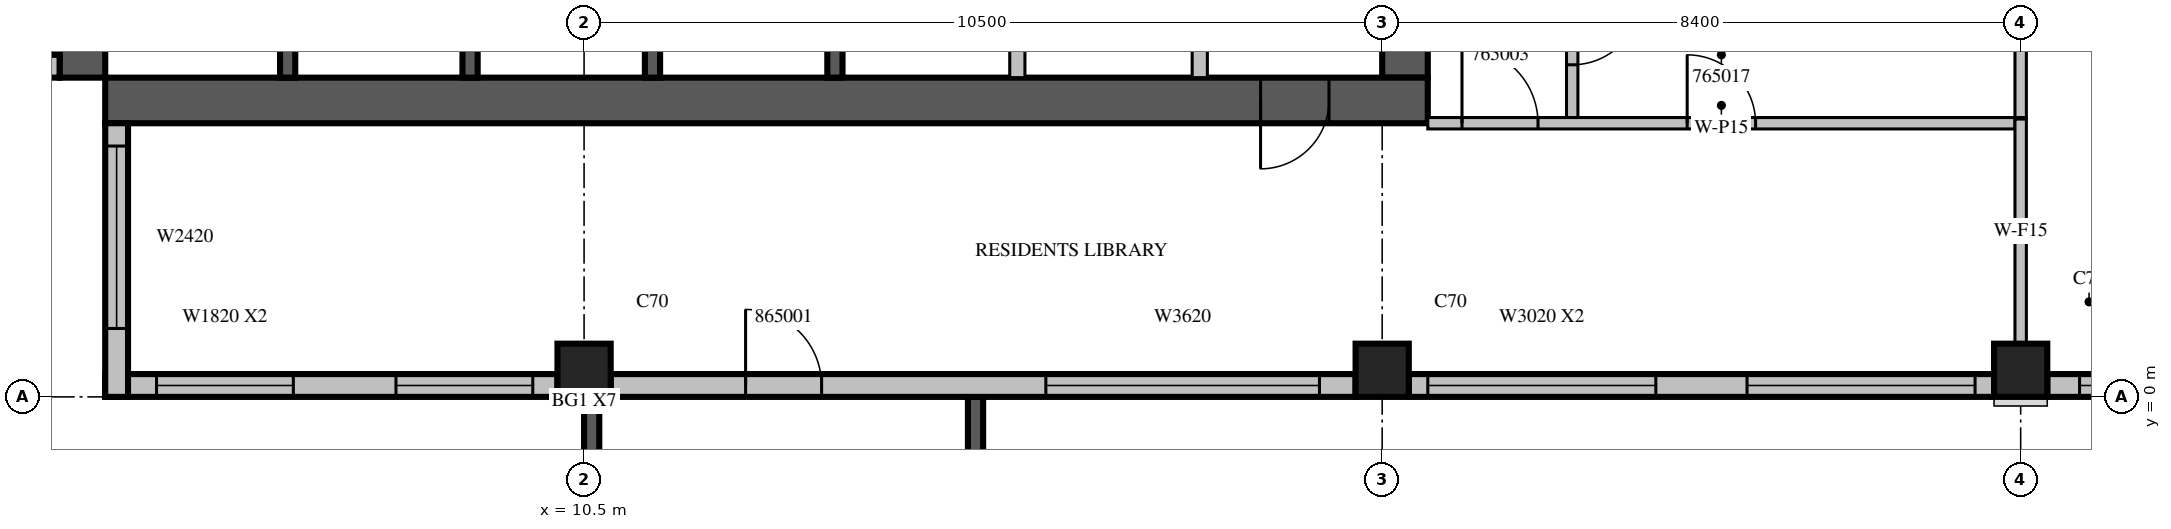
"""IFC4 building model, lengths in metres.
Left out: names, types, materials, properties, quantities, classifications, styles, units other than length and angle.
Written with IfcOpenShell. Run it as: python <this file> out.ifc"""

import sys

from ifc_helpers import new_model, si_unit, direction, frame, frame_2d, origin, origin_2d, place, context, subcontext, project, spatial, rectangle, extrude, source, transform, mapped, element, fill, save


model = new_model("IFC4")
c1 = context("Model", 3, precision=1e-05, world=origin(), true_north=direction((0.0, 1.0)))
c2 = subcontext(c1, "Body", "Model", "MODEL_VIEW")
j1 = project(units=[si_unit("LENGTHUNIT", "METRE"), si_unit("PLANEANGLEUNIT", "RADIAN")], contexts=[c1])
p1 = place(None, origin())
s1 = spatial("IfcSite", under=j1, at=p1, CompositionType="ELEMENT")
p2 = place(p1, origin())
s2 = spatial("IfcBuilding", under=s1, at=p2, CompositionType="ELEMENT")
p3 = place(p2, frame((0.0, 0.0, 288.0)))
s3 = spatial("IfcBuildingStorey", under=s2, at=p3, CompositionType="ELEMENT", Elevation=288.0)
m1 = source(origin(), c2, "Body", "SweptSolid", [
    extrude(rectangle(XDim=0.7, YDim=0.7, at=origin_2d()), origin(), (0.0, 0.0, 1.0), 3.5),
])
for number, where, z_axis, x_axis in (
    (1, (10.5, 0.35, 0.0), (0.0, 0.0, 1.0), (1.0, 0.0, 0.0)),
    (2, (21.0, 0.35, 0.0), (0.0, 0.0, 1.0), (1.0, 0.0, 0.0)),
    (3, (29.4, 0.35, 0.0), (0.0, 0.0, 1.0), (1.0, 0.0, 0.0)),
):
    element("IfcColumn", number, at=place(p3, frame(where, z_axis=z_axis, x_axis=x_axis)), inside=s3, PredefinedType="COLUMN", context=c2, shape_type="MappedRepresentation", body=[
        mapped(m1, transform((0.0, 0.0, 0.0), scale=1.0)),
    ])
m2 = source(origin(), c2, "Body", "SweptSolid", [
    extrude(rectangle(XDim=17.4, YDim=0.6, at=frame_2d((8.7, 0.0))), origin(), (0.0, 0.0, 1.0), 3.5),
])
p4 = place(p3, frame((3.9, 4.2, 0.0), z_axis=(0.0, 0.0, 1.0), x_axis=(0.0, 1.0, 0.0)))
e4 = element("IfcWall", 4, at=p4, inside=s3, PredefinedType="SHEAR", context=c2, shape_type="MappedRepresentation", body=[
    mapped(m2, transform((0.0, 0.0, 0.0), scale=1.0)),
])
m3 = source(origin(), c2, "Body", "SweptSolid", [
    extrude(rectangle(XDim=2.2, YDim=2.1, at=frame_2d((1.1, 1.05))), frame((0.0, 0.31, 0.0), z_axis=(0.0, -1.0, 0.0), x_axis=(1.0, 0.0, 0.0)), (0.0, 0.0, 1.0), 0.62),
])
p5 = place(p4, frame((4.2, 0.0, 0.0)))
e5 = element("IfcOpeningElement", 5, at=p5, cuts=e4, PredefinedType="OPENING", context=c2, shape_type="MappedRepresentation", body=[
    mapped(m3, transform((0.0, 0.0, 0.0), scale=1.0)),
])
m4 = source(origin(), c2, "Body", "SweptSolid", [
    extrude(rectangle(XDim=6.3, YDim=0.6, at=frame_2d((3.15, 0.0))), origin(), (0.0, 0.0, 1.0), 3.5),
])
p6 = place(p3, frame((21.3, 4.2, 0.0), z_axis=(0.0, 0.0, 1.0), x_axis=(0.0, 1.0, 0.0)))
e6 = element("IfcWall", 6, at=p6, inside=s3, PredefinedType="SHEAR", context=c2, shape_type="MappedRepresentation", body=[
    mapped(m4, transform((0.0, 0.0, 0.0), scale=1.0)),
])
p7 = place(p6, frame((4.0, 0.0, 0.0)))
e7 = element("IfcOpeningElement", 7, at=p7, cuts=e6, PredefinedType="OPENING", context=c2, shape_type="MappedRepresentation", body=[
    mapped(m3, transform((0.0, 0.0, 0.0), scale=1.0)),
])
p8 = place(p3, frame((4.2, 3.9, 0.0), z_axis=(0.0, 0.0, 1.0), x_axis=(1.0, 0.0, 0.0)))
e8 = element("IfcWall", 8, at=p8, inside=s3, PredefinedType="SHEAR", context=c2, shape_type="MappedRepresentation", body=[
    mapped(m2, transform((0.0, 0.0, 0.0), scale=1.0)),
])
m5 = source(origin(), c2, "Body", "SweptSolid", [
    extrude(rectangle(XDim=0.9, YDim=2.1, at=frame_2d((0.45, 1.05))), frame((0.0, 0.31, 0.0), z_axis=(0.0, -1.0, 0.0), x_axis=(1.0, 0.0, 0.0)), (0.0, 0.0, 1.0), 0.62),
])
p9 = place(p8, frame((15.2, 0.0, 0.0)))
e9 = element("IfcOpeningElement", 9, at=p9, cuts=e8, PredefinedType="OPENING", context=c2, shape_type="MappedRepresentation", body=[
    mapped(m5, transform((0.0, 0.0, 0.0), scale=1.0)),
])
p10 = place(p3, frame((10.6, 0.0, 0.0), z_axis=(0.0, 0.0, 1.0), x_axis=(0.0, -1.0, 0.0)))
e10 = element("IfcWall", 10, at=p10, inside=s3, PredefinedType="SOLIDWALL", context=c2, shape_type="SweptSolid", body=[
    extrude(rectangle(XDim=3.9, YDim=0.2, at=frame_2d((1.95, 0.0))), origin(), (0.0, 0.0, 1.0), 3.1),
])
m6 = source(origin(), c2, "Body", "SweptSolid", [
    extrude(rectangle(XDim=2.4, YDim=2.0, at=frame_2d((1.2, 1.0))), frame((0.0, 0.11, 0.0), z_axis=(0.0, -1.0, 0.0), x_axis=(1.0, 0.0, 0.0)), (0.0, 0.0, 1.0), 0.22),
])
p11 = place(p10, frame((0.75, 0.0, 0.6)))
e11 = element("IfcOpeningElement", 11, at=p11, cuts=e10, PredefinedType="OPENING", context=c2, shape_type="MappedRepresentation", body=[
    mapped(m6, transform((0.0, 0.0, 0.0), scale=1.0)),
])
m7 = source(origin(), c2, "Body", "SweptSolid", [
    extrude(rectangle(XDim=3.9, YDim=0.2, at=frame_2d((1.95, 0.0))), origin(), (0.0, 0.0, 1.0), 3.1),
])
p12 = place(p3, frame((15.65, 0.0, 0.0), z_axis=(0.0, 0.0, 1.0), x_axis=(0.0, -1.0, 0.0)))
e12 = element("IfcWall", 12, at=p12, inside=s3, PredefinedType="SOLIDWALL", context=c2, shape_type="MappedRepresentation", body=[
    mapped(m7, transform((0.0, 0.0, 0.0), scale=1.0)),
])
p13 = place(p12, frame((0.75, 0.0, 0.6)))
e13 = element("IfcOpeningElement", 13, at=p13, cuts=e12, PredefinedType="OPENING", context=c2, shape_type="MappedRepresentation", body=[
    mapped(m6, transform((0.0, 0.0, 0.0), scale=1.0)),
])
p14 = place(p3, frame((4.2, 0.15, 0.0), z_axis=(0.0, 0.0, 1.0), x_axis=(1.0, 0.0, 0.0)))
e14 = element("IfcWall", 14, at=p14, inside=s3, PredefinedType="STANDARD", context=c2, shape_type="SweptSolid", body=[
    extrude(rectangle(XDim=5.95, YDim=0.3, at=frame_2d((2.975, 0.0))), origin(), (0.0, 0.0, 1.0), 3.1),
])
m8 = source(origin(), c2, "Body", "SweptSolid", [
    extrude(rectangle(XDim=1.8, YDim=2.0, at=frame_2d((0.9, 1.0))), frame((0.0, 0.16, 0.0), z_axis=(0.0, -1.0, 0.0), x_axis=(1.0, 0.0, 0.0)), (0.0, 0.0, 1.0), 0.32),
])
p15 = place(p14, frame((0.675, 0.0, 0.6)))
e15 = element("IfcOpeningElement", 15, at=p15, cuts=e14, PredefinedType="OPENING", context=c2, shape_type="MappedRepresentation", body=[
    mapped(m8, transform((0.0, 0.0, 0.0), scale=1.0)),
])
p16 = place(p14, frame((3.825, 0.0, 0.6)))
e16 = element("IfcOpeningElement", 16, at=p16, cuts=e14, PredefinedType="OPENING", context=c2, shape_type="MappedRepresentation", body=[
    mapped(m8, transform((0.0, 0.0, 0.0), scale=1.0)),
])
m9 = source(origin(), c2, "Body", "SweptSolid", [
    extrude(rectangle(XDim=9.8, YDim=0.3, at=frame_2d((4.9, 0.0))), origin(), (0.0, 0.0, 1.0), 3.1),
])
p17 = place(p3, frame((10.85, 0.15, 0.0), z_axis=(0.0, 0.0, 1.0), x_axis=(1.0, 0.0, 0.0)))
e17 = element("IfcWall", 17, at=p17, inside=s3, PredefinedType="STANDARD", context=c2, shape_type="MappedRepresentation", body=[
    mapped(m9, transform((0.0, 0.0, 0.0), scale=1.0)),
])
m10 = source(origin(), c2, "Body", "SweptSolid", [
    extrude(rectangle(XDim=3.6, YDim=2.0, at=frame_2d((1.8, 1.0))), frame((0.0, 0.16, 0.0), z_axis=(0.0, -1.0, 0.0), x_axis=(1.0, 0.0, 0.0)), (0.0, 0.0, 1.0), 0.32),
])
p18 = place(p17, frame((5.725, 0.0, 0.6)))
e18 = element("IfcOpeningElement", 18, at=p18, cuts=e17, PredefinedType="OPENING", context=c2, shape_type="MappedRepresentation", body=[
    mapped(m10, transform((0.0, 0.0, 0.0), scale=1.0)),
])
m11 = source(origin(), c2, "Body", "SweptSolid", [
    extrude(rectangle(XDim=1.0, YDim=2.1, at=frame_2d((0.5, 1.05))), frame((0.0, 0.16, 0.0), z_axis=(0.0, -1.0, 0.0), x_axis=(1.0, 0.0, 0.0)), (0.0, 0.0, 1.0), 0.32),
])
p19 = place(p17, frame((1.775, 0.0, 0.0)))
e19 = element("IfcOpeningElement", 19, at=p19, cuts=e17, PredefinedType="OPENING", context=c2, shape_type="MappedRepresentation", body=[
    mapped(m11, transform((0.0, 0.0, 0.0), scale=1.0)),
])
m12 = source(origin(), c2, "Body", "SweptSolid", [
    extrude(rectangle(XDim=7.7, YDim=0.3, at=frame_2d((3.85, 0.0))), origin(), (0.0, 0.0, 1.0), 3.1),
])
p20 = place(p3, frame((21.35, 0.15, 0.0), z_axis=(0.0, 0.0, 1.0), x_axis=(1.0, 0.0, 0.0)))
e20 = element("IfcWall", 20, at=p20, inside=s3, PredefinedType="STANDARD", context=c2, shape_type="MappedRepresentation", body=[
    mapped(m12, transform((0.0, 0.0, 0.0), scale=1.0)),
])
m13 = source(origin(), c2, "Body", "SweptSolid", [
    extrude(rectangle(XDim=3.0, YDim=2.0, at=frame_2d((1.5, 1.0))), frame((0.0, 0.16, 0.0), z_axis=(0.0, -1.0, 0.0), x_axis=(1.0, 0.0, 0.0)), (0.0, 0.0, 1.0), 0.32),
])
p21 = place(p20, frame((0.25, 0.0, 0.6)))
e21 = element("IfcOpeningElement", 21, at=p21, cuts=e20, PredefinedType="OPENING", context=c2, shape_type="MappedRepresentation", body=[
    mapped(m13, transform((0.0, 0.0, 0.0), scale=1.0)),
])
p22 = place(p20, frame((4.45, 0.0, 0.6)))
e22 = element("IfcOpeningElement", 22, at=p22, cuts=e20, PredefinedType="OPENING", context=c2, shape_type="MappedRepresentation", body=[
    mapped(m13, transform((0.0, 0.0, 0.0), scale=1.0)),
])
m14 = source(origin(), c2, "Body", "SweptSolid", [
    extrude(rectangle(XDim=2.05, YDim=0.3, at=frame_2d((1.025, 0.0))), origin(), (0.0, 0.0, 1.0), 3.1),
])
p23 = place(p3, frame((29.75, 0.15, 0.0), z_axis=(0.0, 0.0, 1.0), x_axis=(1.0, 0.0, 0.0)))
e23 = element("IfcWall", 23, at=p23, inside=s3, PredefinedType="STANDARD", context=c2, shape_type="MappedRepresentation", body=[
    mapped(m14, transform((0.0, 0.0, 0.0), scale=1.0)),
])
m15 = source(origin(), c2, "Body", "SweptSolid", [
    extrude(rectangle(XDim=1.2, YDim=2.0, at=frame_2d((0.6, 1.0))), frame((0.0, 0.16, 0.0), z_axis=(0.0, -1.0, 0.0), x_axis=(1.0, 0.0, 0.0)), (0.0, 0.0, 1.0), 0.32),
])
p24 = place(p23, frame((0.425, 0.0, 0.6)))
e24 = element("IfcOpeningElement", 24, at=p24, cuts=e23, PredefinedType="OPENING", context=c2, shape_type="MappedRepresentation", body=[
    mapped(m15, transform((0.0, 0.0, 0.0), scale=1.0)),
])
m16 = source(origin(), c2, "Body", "SweptSolid", [
    extrude(rectangle(XDim=3.6, YDim=0.3, at=frame_2d((1.8, 0.0))), origin(), (0.0, 0.0, 1.0), 3.1),
])
p25 = place(p3, frame((0.0, 4.35, 0.0), z_axis=(0.0, 0.0, 1.0), x_axis=(1.0, 0.0, 0.0)))
e25 = element("IfcWall", 25, at=p25, inside=s3, PredefinedType="STANDARD", context=c2, shape_type="MappedRepresentation", body=[
    mapped(m16, transform((0.0, 0.0, 0.0), scale=1.0)),
])
m17 = source(origin(), c2, "Body", "SweptSolid", [
    extrude(rectangle(XDim=2.4, YDim=2.0, at=frame_2d((1.2, 1.0))), frame((0.0, 0.16, 0.0), z_axis=(0.0, -1.0, 0.0), x_axis=(1.0, 0.0, 0.0)), (0.0, 0.0, 1.0), 0.32),
])
p26 = place(p25, frame((0.9, 0.0, 0.6)))
e26 = element("IfcOpeningElement", 26, at=p26, cuts=e25, PredefinedType="OPENING", context=c2, shape_type="MappedRepresentation", body=[
    mapped(m17, transform((0.0, 0.0, 0.0), scale=1.0)),
])
p27 = place(p3, frame((4.35, 3.6, 0.0), z_axis=(0.0, 0.0, 1.0), x_axis=(0.0, -1.0, 0.0)))
e27 = element("IfcWall", 27, at=p27, inside=s3, PredefinedType="STANDARD", context=c2, shape_type="MappedRepresentation", body=[
    mapped(m16, transform((0.0, 0.0, 0.0), scale=1.0)),
])
p28 = place(p27, frame((0.3, 0.0, 0.6)))
e28 = element("IfcOpeningElement", 28, at=p28, cuts=e27, PredefinedType="OPENING", context=c2, shape_type="MappedRepresentation", body=[
    mapped(m17, transform((0.0, 0.0, 0.0), scale=1.0)),
])
m18 = source(origin(), c2, "Body", "SweptSolid", [
    extrude(rectangle(XDim=3.1, YDim=0.2, at=frame_2d((1.55, 0.0))), origin(), (0.0, 0.0, 1.0), 3.5),
])
for number, where, z_axis, x_axis in (
    (29, (6.6, 4.2, 0.0), (0.0, 0.0, 1.0), (0.0, 1.0, 0.0)),
    (30, (9.0, 4.2, 0.0), (0.0, 0.0, 1.0), (0.0, 1.0, 0.0)),
    (31, (11.4, 4.2, 0.0), (0.0, 0.0, 1.0), (0.0, 1.0, 0.0)),
):
    element("IfcWall", number, at=place(p3, frame(where, z_axis=z_axis, x_axis=x_axis)), inside=s3, PredefinedType="SOLIDWALL", context=c2, shape_type="MappedRepresentation", body=[
        mapped(m18, transform((0.0, 0.0, 0.0), scale=1.0)),
    ])
m19 = source(origin(), c2, "Body", "SweptSolid", [
    extrude(rectangle(XDim=3.1, YDim=0.2, at=frame_2d((1.55, 0.0))), origin(), (0.0, 0.0, 1.0), 3.1),
])
p29 = place(p3, frame((13.8, 4.2, 0.0), z_axis=(0.0, 0.0, 1.0), x_axis=(0.0, 1.0, 0.0)))
e32 = element("IfcWall", 32, at=p29, inside=s3, PredefinedType="SOLIDWALL", context=c2, shape_type="MappedRepresentation", body=[
    mapped(m19, transform((0.0, 0.0, 0.0), scale=1.0)),
])
p30 = place(p3, frame((16.2, 4.2, 0.0), z_axis=(0.0, 0.0, 1.0), x_axis=(0.0, 1.0, 0.0)))
e33 = element("IfcWall", 33, at=p30, inside=s3, PredefinedType="PARTITIONING", context=c2, shape_type="SweptSolid", body=[
    extrude(rectangle(XDim=3.1, YDim=0.2, at=frame_2d((1.55, 0.0))), origin(), (0.0, 0.0, 1.0), 3.1),
])
m20 = source(origin(), c2, "Body", "SweptSolid", [
    extrude(rectangle(XDim=3.1, YDim=0.2, at=frame_2d((1.55, 0.0))), origin(), (0.0, 0.0, 1.0), 3.1),
])
p31 = place(p3, frame((18.6, 4.2, 0.0), z_axis=(0.0, 0.0, 1.0), x_axis=(0.0, 1.0, 0.0)))
e34 = element("IfcWall", 34, at=p31, inside=s3, PredefinedType="PARTITIONING", context=c2, shape_type="MappedRepresentation", body=[
    mapped(m20, transform((0.0, 0.0, 0.0), scale=1.0)),
])
m21 = source(origin(), c2, "Body", "SweptSolid", [
    extrude(rectangle(XDim=4.575, YDim=0.15, at=frame_2d((2.288, 0.0))), origin(), (0.0, 0.0, 1.0), 3.1),
])
p32 = place(p3, frame((23.5, 8.25, 0.0), z_axis=(0.0, 0.0, 1.0), x_axis=(0.0, -1.0, 0.0)))
e35 = element("IfcWall", 35, at=p32, inside=s3, PredefinedType="PARTITIONING", context=c2, shape_type="MappedRepresentation", body=[
    mapped(m21, transform((0.0, 0.0, 0.0), scale=1.0)),
])
m22 = source(origin(), c2, "Body", "SweptSolid", [
    extrude(rectangle(XDim=0.9, YDim=2.1, at=frame_2d((0.45, 1.05))), frame((0.0, 0.085, 0.0), z_axis=(0.0, -1.0, 0.0), x_axis=(1.0, 0.0, 0.0)), (0.0, 0.0, 1.0), 0.17),
])
p33 = place(p32, frame((2.981, 0.0, 0.0)))
e36 = element("IfcOpeningElement", 36, at=p33, cuts=e35, PredefinedType="OPENING", context=c2, shape_type="MappedRepresentation", body=[
    mapped(m22, transform((0.0, 0.0, 0.0), scale=1.0)),
])
p34 = place(p3, frame((29.4, 3.675, 0.0), z_axis=(0.0, 0.0, 1.0), x_axis=(0.0, 1.0, 0.0)))
e37 = element("IfcWall", 37, at=p34, inside=s3, PredefinedType="PARTITIONING", context=c2, shape_type="MappedRepresentation", body=[
    mapped(m21, transform((0.0, 0.0, 0.0), scale=1.0)),
])
m23 = source(origin(), c2, "Body", "SweptSolid", [
    extrude(rectangle(XDim=7.725, YDim=0.15, at=frame_2d((3.862, 0.0))), origin(), (0.0, 0.0, 1.0), 3.1),
])
p35 = place(p3, frame((21.6, 3.6, 0.0), z_axis=(0.0, 0.0, 1.0), x_axis=(1.0, 0.0, 0.0)))
e38 = element("IfcWall", 38, at=p35, inside=s3, PredefinedType="PARTITIONING", context=c2, shape_type="MappedRepresentation", body=[
    mapped(m23, transform((0.0, 0.0, 0.0), scale=1.0)),
])
m24 = source(origin(), c2, "Body", "SweptSolid", [
    extrude(rectangle(XDim=1.0, YDim=2.1, at=frame_2d((0.5, 1.05))), frame((0.0, 0.085, 0.0), z_axis=(0.0, -1.0, 0.0), x_axis=(1.0, 0.0, 0.0)), (0.0, 0.0, 1.0), 0.17),
])
p36 = place(p35, frame((0.45, 0.0, 0.0)))
e39 = element("IfcOpeningElement", 39, at=p36, cuts=e38, PredefinedType="OPENING", context=c2, shape_type="MappedRepresentation", body=[
    mapped(m24, transform((0.0, 0.0, 0.0), scale=1.0)),
])
p37 = place(p35, frame((3.413, 0.0, 0.0)))
e40 = element("IfcOpeningElement", 40, at=p37, cuts=e38, PredefinedType="OPENING", context=c2, shape_type="MappedRepresentation", body=[
    mapped(m22, transform((0.0, 0.0, 0.0), scale=1.0)),
])
m25 = source(origin(), c2, "Body", "SweptSolid", [
    extrude(rectangle(XDim=2.956, YDim=0.15, at=frame_2d((1.478, 0.0))), origin(), (0.0, 0.0, 1.0), 3.1),
])
p38 = place(p3, frame((29.4, 0.699, 0.0), z_axis=(0.0, 0.0, 1.0), x_axis=(0.0, 1.0, 0.0)))
e41 = element("IfcWall", 41, at=p38, inside=s3, PredefinedType="PARTITIONING", context=c2, shape_type="MappedRepresentation", body=[
    mapped(m25, transform((0.0, 0.0, 0.0), scale=1.0)),
])
m26 = source(origin(), c2, "Body", "SweptSolid", [
    extrude(rectangle(XDim=1.8, YDim=2.0, at=frame_2d((0.9, 1.0))), frame((0.0, 0.03, 0.0), z_axis=(0.0, -1.0, 0.0), x_axis=(1.0, 0.0, 0.0)), (0.0, 0.0, 1.0), 0.06),
])
p39 = place(p15, origin())
e42 = element("IfcWindow", 42, at=p39, inside=s3, PartitioningType="SINGLE_PANEL", PredefinedType="WINDOW", context=c2, shape_type="MappedRepresentation", body=[
    mapped(m26, transform((0.0, 0.0, 0.0), scale=1.0)),
])
fill(e15, e42)
p40 = place(p16, origin())
e43 = element("IfcWindow", 43, at=p40, inside=s3, PartitioningType="SINGLE_PANEL", PredefinedType="WINDOW", context=c2, shape_type="MappedRepresentation", body=[
    mapped(m26, transform((0.0, 0.0, 0.0), scale=1.0)),
])
fill(e16, e43)
m27 = source(origin(), c2, "Body", "SweptSolid", [
    extrude(rectangle(XDim=3.6, YDim=2.0, at=frame_2d((1.8, 1.0))), frame((0.0, 0.03, 0.0), z_axis=(0.0, -1.0, 0.0), x_axis=(1.0, 0.0, 0.0)), (0.0, 0.0, 1.0), 0.06),
])
p41 = place(p18, origin())
e44 = element("IfcWindow", 44, at=p41, inside=s3, PartitioningType="SINGLE_PANEL", PredefinedType="WINDOW", context=c2, shape_type="MappedRepresentation", body=[
    mapped(m27, transform((0.0, 0.0, 0.0), scale=1.0)),
])
fill(e18, e44)
m28 = source(origin(), c2, "Body", "SweptSolid", [
    extrude(rectangle(XDim=3.0, YDim=2.0, at=frame_2d((1.5, 1.0))), frame((0.0, 0.03, 0.0), z_axis=(0.0, -1.0, 0.0), x_axis=(1.0, 0.0, 0.0)), (0.0, 0.0, 1.0), 0.06),
])
p42 = place(p21, origin())
e45 = element("IfcWindow", 45, at=p42, inside=s3, PartitioningType="SINGLE_PANEL", PredefinedType="WINDOW", context=c2, shape_type="MappedRepresentation", body=[
    mapped(m28, transform((0.0, 0.0, 0.0), scale=1.0)),
])
fill(e21, e45)
p43 = place(p22, origin())
e46 = element("IfcWindow", 46, at=p43, inside=s3, PartitioningType="SINGLE_PANEL", PredefinedType="WINDOW", context=c2, shape_type="MappedRepresentation", body=[
    mapped(m28, transform((0.0, 0.0, 0.0), scale=1.0)),
])
fill(e22, e46)
m29 = source(origin(), c2, "Body", "SweptSolid", [
    extrude(rectangle(XDim=1.2, YDim=2.0, at=frame_2d((0.6, 1.0))), frame((0.0, 0.03, 0.0), z_axis=(0.0, -1.0, 0.0), x_axis=(1.0, 0.0, 0.0)), (0.0, 0.0, 1.0), 0.06),
])
p44 = place(p24, origin())
e47 = element("IfcWindow", 47, at=p44, inside=s3, PartitioningType="SINGLE_PANEL", PredefinedType="WINDOW", context=c2, shape_type="MappedRepresentation", body=[
    mapped(m29, transform((0.0, 0.0, 0.0), scale=1.0)),
])
fill(e24, e47)
m30 = source(origin(), c2, "Body", "SweptSolid", [
    extrude(rectangle(XDim=2.4, YDim=2.0, at=frame_2d((1.2, 1.0))), frame((0.0, 0.03, 0.0), z_axis=(0.0, -1.0, 0.0), x_axis=(1.0, 0.0, 0.0)), (0.0, 0.0, 1.0), 0.06),
])
p45 = place(p28, origin())
e48 = element("IfcWindow", 48, at=p45, inside=s3, PartitioningType="SINGLE_PANEL", PredefinedType="WINDOW", context=c2, shape_type="MappedRepresentation", body=[
    mapped(m30, transform((0.0, 0.0, 0.0), scale=1.0)),
])
fill(e28, e48)
m31 = source(origin(), c2, "Body", "SweptSolid", [
    extrude(rectangle(XDim=0.9, YDim=2.1, at=frame_2d((0.45, 1.05))), frame((0.0, 0.025, 0.0), z_axis=(0.0, -1.0, 0.0), x_axis=(1.0, 0.0, 0.0)), (0.0, 0.0, 1.0), 0.05),
])
p46 = place(p9, origin())
e49 = element("IfcDoor", 49, at=p46, inside=s3, OperationType="SINGLE_SWING_RIGHT", PredefinedType="DOOR", context=c2, shape_type="MappedRepresentation", body=[
    mapped(m31, transform((0.0, 0.0, 0.0), scale=1.0)),
])
fill(e9, e49)
p47 = place(p33, origin())
e50 = element("IfcDoor", 50, at=p47, inside=s3, OperationType="SINGLE_SWING_LEFT", PredefinedType="DOOR", context=c2, shape_type="MappedRepresentation", body=[
    mapped(m31, transform((0.0, 0.0, 0.0), scale=1.0)),
])
fill(e36, e50)
m32 = source(origin(), c2, "Body", "SweptSolid", [
    extrude(rectangle(XDim=1.0, YDim=2.1, at=frame_2d((0.5, 1.05))), frame((0.0, 0.025, 0.0), z_axis=(0.0, -1.0, 0.0), x_axis=(1.0, 0.0, 0.0)), (0.0, 0.0, 1.0), 0.05),
])
p48 = place(p36, origin())
e51 = element("IfcDoor", 51, at=p48, inside=s3, OperationType="SINGLE_SWING_LEFT", PredefinedType="DOOR", context=c2, shape_type="MappedRepresentation", body=[
    mapped(m32, transform((0.0, 0.0, 0.0), scale=1.0)),
])
fill(e39, e51)
p49 = place(p37, origin())
e52 = element("IfcDoor", 52, at=p49, inside=s3, OperationType="SINGLE_SWING_LEFT", PredefinedType="DOOR", context=c2, shape_type="MappedRepresentation", body=[
    mapped(m31, transform((0.0, 0.0, 0.0), scale=1.0)),
])
fill(e40, e52)
p50 = place(p19, origin())
e53 = element("IfcDoor", 53, at=p50, inside=s3, OperationType="SINGLE_SWING_LEFT", PredefinedType="DOOR", context=c2, shape_type="MappedRepresentation", body=[
    mapped(m32, transform((0.0, 0.0, 0.0), scale=1.0)),
])
fill(e19, e53)
save(model, sys.argv[1])
